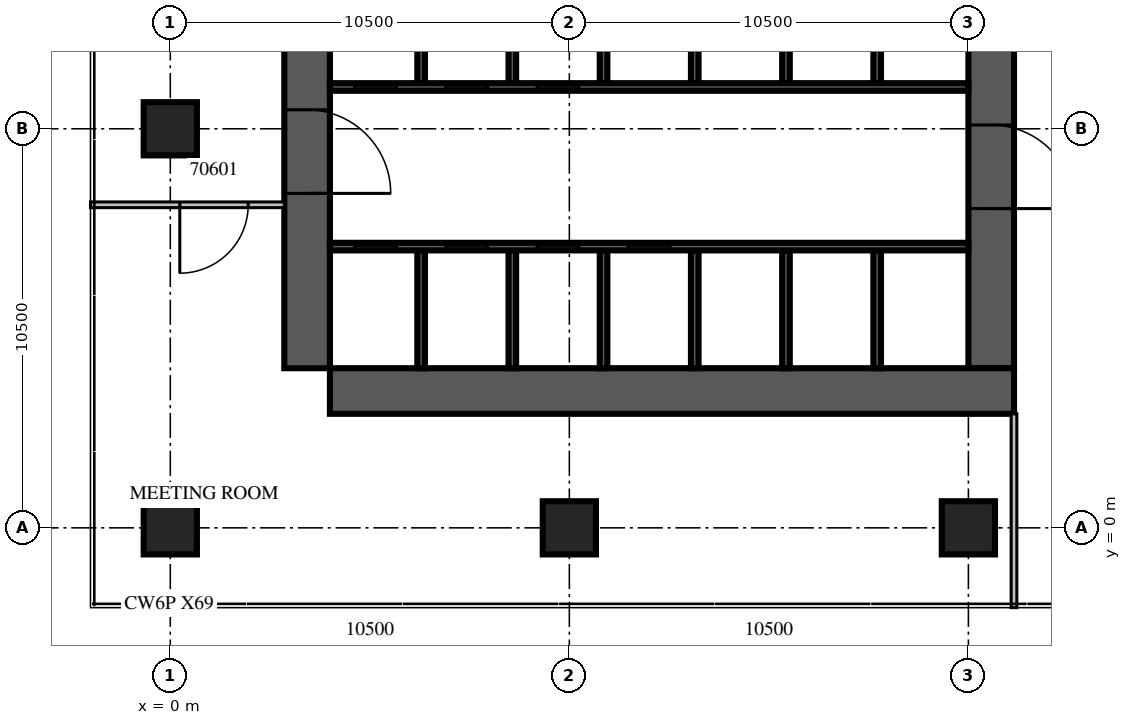
"""IFC4 building model, lengths in metres.
Left out: names, types, materials, properties, quantities, classifications, styles, units other than length and angle.
Written with IfcOpenShell. Run it as: python <this file> out.ifc"""

import sys

from ifc_helpers import new_model, si_unit, direction, frame, frame_2d, origin, origin_2d, place, context, subcontext, project, spatial, rectangle, extrude, source, transform, mapped, element, fill, save


model = new_model("IFC4")
c1 = context("Model", 3, precision=1e-05, world=origin(), true_north=direction((0.0, 1.0)))
c2 = subcontext(c1, "Body", "Model", "MODEL_VIEW")
j1 = project(units=[si_unit("LENGTHUNIT", "METRE"), si_unit("PLANEANGLEUNIT", "RADIAN")], contexts=[c1])
p1 = place(None, origin())
s1 = spatial("IfcSite", under=j1, at=p1, CompositionType="ELEMENT")
p2 = place(p1, origin())
s2 = spatial("IfcBuilding", under=s1, at=p2, CompositionType="ELEMENT")
p3 = place(p2, frame((0.0, 0.0, 18.3)))
s3 = spatial("IfcBuildingStorey", under=s2, at=p3, CompositionType="ELEMENT", Elevation=18.3)
m1 = source(origin(), c2, "Body", "SweptSolid", [
    extrude(rectangle(XDim=1.4, YDim=1.4, at=origin_2d()), origin(), (0.0, 0.0, 1.0), 5.4),
])
for number, where, z_axis, x_axis in (
    (1, (0.0, 0.0, 0.0), (0.0, 0.0, 1.0), (1.0, 0.0, 0.0)),
    (2, (0.0, 10.5, 0.0), (0.0, 0.0, 1.0), (1.0, 0.0, 0.0)),
    (3, (10.5, 0.0, 0.0), (0.0, 0.0, 1.0), (1.0, 0.0, 0.0)),
    (4, (21.0, 0.0, 0.0), (0.0, 0.0, 1.0), (1.0, 0.0, 0.0)),
):
    element("IfcColumn", number, at=place(p3, frame(where, z_axis=z_axis, x_axis=x_axis)), inside=s3, PredefinedType="COLUMN", context=c2, shape_type="MappedRepresentation", body=[
        mapped(m1, transform((0.0, 0.0, 0.0), scale=1.0)),
    ])
m2 = source(origin(), c2, "Body", "SweptSolid", [
    extrude(rectangle(XDim=18.0, YDim=1.2, at=frame_2d((9.0, 0.0))), origin(), (0.0, 0.0, 1.0), 5.4),
])
p4 = place(p3, frame((3.6, 4.2, 0.0), z_axis=(0.0, 0.0, 1.0), x_axis=(0.0, 1.0, 0.0)))
e5 = element("IfcWall", 5, at=p4, inside=s3, PredefinedType="SHEAR", context=c2, shape_type="MappedRepresentation", body=[
    mapped(m2, transform((0.0, 0.0, 0.0), scale=1.0)),
])
m3 = source(origin(), c2, "Body", "SweptSolid", [
    extrude(rectangle(XDim=2.2, YDim=2.1, at=frame_2d((1.1, 1.05))), frame((0.0, 0.61, 0.0), z_axis=(0.0, -1.0, 0.0), x_axis=(1.0, 0.0, 0.0)), (0.0, 0.0, 1.0), 1.22),
])
p5 = place(p4, frame((4.6, 0.0, 0.0)))
e6 = element("IfcOpeningElement", 6, at=p5, cuts=e5, PredefinedType="OPENING", context=c2, shape_type="MappedRepresentation", body=[
    mapped(m3, transform((0.0, 0.0, 0.0), scale=1.0)),
])
m4 = source(origin(), c2, "Body", "SweptSolid", [
    extrude(rectangle(XDim=16.8, YDim=1.2, at=frame_2d((8.4, 0.0))), origin(), (0.0, 0.0, 1.0), 5.4),
])
p6 = place(p3, frame((21.6, 4.2, 0.0), z_axis=(0.0, 0.0, 1.0), x_axis=(0.0, 1.0, 0.0)))
e7 = element("IfcWall", 7, at=p6, inside=s3, PredefinedType="SHEAR", context=c2, shape_type="MappedRepresentation", body=[
    mapped(m4, transform((0.0, 0.0, 0.0), scale=1.0)),
])
p7 = place(p6, frame((4.2, 0.0, 0.0)))
e8 = element("IfcOpeningElement", 8, at=p7, cuts=e7, PredefinedType="OPENING", context=c2, shape_type="MappedRepresentation", body=[
    mapped(m3, transform((0.0, 0.0, 0.0), scale=1.0)),
])
m5 = source(origin(), c2, "Body", "SweptSolid", [
    extrude(rectangle(XDim=1.2, YDim=2.1, at=frame_2d((0.6, 1.05))), frame((0.0, 0.61, 0.0), z_axis=(0.0, -1.0, 0.0), x_axis=(1.0, 0.0, 0.0)), (0.0, 0.0, 1.0), 1.22),
])
p8 = place(p6, frame((14.7, 0.0, 0.0)))
e9 = element("IfcOpeningElement", 9, at=p8, cuts=e7, PredefinedType="OPENING", context=c2, shape_type="MappedRepresentation", body=[
    mapped(m5, transform((0.0, 0.0, 0.0), scale=1.0)),
])
p9 = place(p3, frame((4.2, 3.6, 0.0), z_axis=(0.0, 0.0, 1.0), x_axis=(1.0, 0.0, 0.0)))
e10 = element("IfcWall", 10, at=p9, inside=s3, PredefinedType="SHEAR", context=c2, shape_type="MappedRepresentation", body=[
    mapped(m2, transform((0.0, 0.0, 0.0), scale=1.0)),
])
m6 = source(origin(), c2, "Body", "SweptSolid", [
    extrude(rectangle(XDim=3.1, YDim=0.2, at=frame_2d((1.55, 0.0))), origin(), (0.0, 0.0, 1.0), 5.4),
])
for number, where, z_axis, x_axis in (
    (11, (6.6, 4.2, 0.0), (0.0, 0.0, 1.0), (0.0, 1.0, 0.0)),
    (12, (9.0, 4.2, 0.0), (0.0, 0.0, 1.0), (0.0, 1.0, 0.0)),
    (13, (11.4, 4.2, 0.0), (0.0, 0.0, 1.0), (0.0, 1.0, 0.0)),
    (14, (13.8, 4.2, 0.0), (0.0, 0.0, 1.0), (0.0, 1.0, 0.0)),
    (15, (16.2, 4.2, 0.0), (0.0, 0.0, 1.0), (0.0, 1.0, 0.0)),
    (16, (18.6, 4.2, 0.0), (0.0, 0.0, 1.0), (0.0, 1.0, 0.0)),
):
    element("IfcWall", number, at=place(p3, frame(where, z_axis=z_axis, x_axis=x_axis)), inside=s3, PredefinedType="SOLIDWALL", context=c2, shape_type="MappedRepresentation", body=[
        mapped(m6, transform((0.0, 0.0, 0.0), scale=1.0)),
    ])
m7 = source(origin(), c2, "Body", "SweptSolid", [
    extrude(rectangle(XDim=3.0, YDim=0.2, at=frame_2d((1.5, 0.0))), origin(), (0.0, 0.0, 1.0), 5.4),
])
for number, where, z_axis, x_axis in (
    (17, (6.6, 11.7, 0.0), (0.0, 0.0, 1.0), (0.0, 1.0, 0.0)),
    (18, (9.0, 11.7, 0.0), (0.0, 0.0, 1.0), (0.0, 1.0, 0.0)),
    (19, (11.4, 11.7, 0.0), (0.0, 0.0, 1.0), (0.0, 1.0, 0.0)),
    (20, (13.8, 11.7, 0.0), (0.0, 0.0, 1.0), (0.0, 1.0, 0.0)),
    (21, (16.2, 11.7, 0.0), (0.0, 0.0, 1.0), (0.0, 1.0, 0.0)),
    (22, (18.6, 11.7, 0.0), (0.0, 0.0, 1.0), (0.0, 1.0, 0.0)),
):
    element("IfcWall", number, at=place(p3, frame(where, z_axis=z_axis, x_axis=x_axis)), inside=s3, PredefinedType="SOLIDWALL", context=c2, shape_type="MappedRepresentation", body=[
        mapped(m7, transform((0.0, 0.0, 0.0), scale=1.0)),
    ])
m8 = source(origin(), c2, "Body", "SweptSolid", [
    extrude(rectangle(XDim=16.8, YDim=0.2, at=frame_2d((8.4, 0.0))), origin(), (0.0, 0.0, 1.0), 5.4),
])
p10 = place(p3, frame((4.2, 7.4, 0.0), z_axis=(0.0, 0.0, 1.0), x_axis=(1.0, 0.0, 0.0)))
e23 = element("IfcWall", 23, at=p10, inside=s3, PredefinedType="SOLIDWALL", context=c2, shape_type="MappedRepresentation", body=[
    mapped(m8, transform((0.0, 0.0, 0.0), scale=1.0)),
])
m9 = source(origin(), c2, "Body", "SweptSolid", [
    extrude(rectangle(XDim=1.1, YDim=2.1, at=frame_2d((0.55, 1.05))), frame((0.0, 0.11, 0.0), z_axis=(0.0, -1.0, 0.0), x_axis=(1.0, 0.0, 0.0)), (0.0, 0.0, 1.0), 0.22),
])
p11 = place(p10, frame((0.65, 0.0, 0.0)))
e24 = element("IfcOpeningElement", 24, at=p11, cuts=e23, PredefinedType="OPENING", context=c2, shape_type="MappedRepresentation", body=[
    mapped(m9, transform((0.0, 0.0, 0.0), scale=1.0)),
])
p12 = place(p10, frame((3.05, 0.0, 0.0)))
e25 = element("IfcOpeningElement", 25, at=p12, cuts=e23, PredefinedType="OPENING", context=c2, shape_type="MappedRepresentation", body=[
    mapped(m9, transform((0.0, 0.0, 0.0), scale=1.0)),
])
p13 = place(p10, frame((5.45, 0.0, 0.0)))
e26 = element("IfcOpeningElement", 26, at=p13, cuts=e23, PredefinedType="OPENING", context=c2, shape_type="MappedRepresentation", body=[
    mapped(m9, transform((0.0, 0.0, 0.0), scale=1.0)),
])
p14 = place(p10, frame((7.85, 0.0, 0.0)))
e27 = element("IfcOpeningElement", 27, at=p14, cuts=e23, PredefinedType="OPENING", context=c2, shape_type="MappedRepresentation", body=[
    mapped(m9, transform((0.0, 0.0, 0.0), scale=1.0)),
])
p15 = place(p3, frame((4.2, 11.6, 0.0), z_axis=(0.0, 0.0, 1.0), x_axis=(1.0, 0.0, 0.0)))
e28 = element("IfcWall", 28, at=p15, inside=s3, PredefinedType="SOLIDWALL", context=c2, shape_type="MappedRepresentation", body=[
    mapped(m8, transform((0.0, 0.0, 0.0), scale=1.0)),
])
p16 = place(p15, frame((0.65, 0.0, 0.0)))
e29 = element("IfcOpeningElement", 29, at=p16, cuts=e28, PredefinedType="OPENING", context=c2, shape_type="MappedRepresentation", body=[
    mapped(m9, transform((0.0, 0.0, 0.0), scale=1.0)),
])
p17 = place(p15, frame((3.05, 0.0, 0.0)))
e30 = element("IfcOpeningElement", 30, at=p17, cuts=e28, PredefinedType="OPENING", context=c2, shape_type="MappedRepresentation", body=[
    mapped(m9, transform((0.0, 0.0, 0.0), scale=1.0)),
])
p18 = place(p15, frame((5.45, 0.0, 0.0)))
e31 = element("IfcOpeningElement", 31, at=p18, cuts=e28, PredefinedType="OPENING", context=c2, shape_type="MappedRepresentation", body=[
    mapped(m9, transform((0.0, 0.0, 0.0), scale=1.0)),
])
m10 = source(origin(), c2, "Body", "SweptSolid", [
    extrude(rectangle(XDim=5.1, YDim=0.15, at=frame_2d((2.55, 0.0))), origin(), (0.0, 0.0, 1.0), 4.8),
])
p19 = place(p3, frame((-2.1, 8.5, 0.0), z_axis=(0.0, 0.0, 1.0), x_axis=(1.0, 0.0, 0.0)))
e32 = element("IfcWall", 32, at=p19, inside=s3, PredefinedType="PARTITIONING", context=c2, shape_type="MappedRepresentation", body=[
    mapped(m10, transform((0.0, 0.0, 0.0), scale=1.0)),
])
m11 = source(origin(), c2, "Body", "SweptSolid", [
    extrude(rectangle(XDim=1.8, YDim=2.1, at=frame_2d((0.9, 1.05))), frame((0.0, 0.085, 0.0), z_axis=(0.0, -1.0, 0.0), x_axis=(1.0, 0.0, 0.0)), (0.0, 0.0, 1.0), 0.17),
])
p20 = place(p19, frame((2.35, 0.0, 0.0)))
e33 = element("IfcOpeningElement", 33, at=p20, cuts=e32, PredefinedType="OPENING", context=c2, shape_type="MappedRepresentation", body=[
    mapped(m11, transform((0.0, 0.0, 0.0), scale=1.0)),
])
p21 = place(p3, frame((22.2, -2.1, 0.0), z_axis=(0.0, 0.0, 1.0), x_axis=(0.0, 1.0, 0.0)))
e34 = element("IfcWall", 34, at=p21, inside=s3, PredefinedType="PARTITIONING", context=c2, shape_type="MappedRepresentation", body=[
    mapped(m10, transform((0.0, 0.0, 0.0), scale=1.0)),
])
m12 = source(origin(), c2, "Body", "SweptSolid", [
    extrude(rectangle(XDim=1.1, YDim=2.1, at=frame_2d((0.55, 1.05))), frame((0.0, 0.025, 0.0), z_axis=(0.0, -1.0, 0.0), x_axis=(1.0, 0.0, 0.0)), (0.0, 0.0, 1.0), 0.05),
])
p22 = place(p11, origin())
e35 = element("IfcDoor", 35, at=p22, inside=s3, OperationType="SLIDING_TO_LEFT", PredefinedType="DOOR", context=c2, shape_type="MappedRepresentation", body=[
    mapped(m12, transform((0.0, 0.0, 0.0), scale=1.0)),
])
fill(e24, e35)
p23 = place(p12, origin())
e36 = element("IfcDoor", 36, at=p23, inside=s3, OperationType="SLIDING_TO_LEFT", PredefinedType="DOOR", context=c2, shape_type="MappedRepresentation", body=[
    mapped(m12, transform((0.0, 0.0, 0.0), scale=1.0)),
])
fill(e25, e36)
p24 = place(p13, origin())
e37 = element("IfcDoor", 37, at=p24, inside=s3, OperationType="SLIDING_TO_LEFT", PredefinedType="DOOR", context=c2, shape_type="MappedRepresentation", body=[
    mapped(m12, transform((0.0, 0.0, 0.0), scale=1.0)),
])
fill(e26, e37)
p25 = place(p14, origin())
e38 = element("IfcDoor", 38, at=p25, inside=s3, OperationType="SLIDING_TO_LEFT", PredefinedType="DOOR", context=c2, shape_type="MappedRepresentation", body=[
    mapped(m12, transform((0.0, 0.0, 0.0), scale=1.0)),
])
fill(e27, e38)
p26 = place(p16, origin())
e39 = element("IfcDoor", 39, at=p26, inside=s3, OperationType="SLIDING_TO_LEFT", PredefinedType="DOOR", context=c2, shape_type="MappedRepresentation", body=[
    mapped(m12, transform((0.0, 0.0, 0.0), scale=1.0)),
])
fill(e29, e39)
p27 = place(p17, origin())
e40 = element("IfcDoor", 40, at=p27, inside=s3, OperationType="SLIDING_TO_LEFT", PredefinedType="DOOR", context=c2, shape_type="MappedRepresentation", body=[
    mapped(m12, transform((0.0, 0.0, 0.0), scale=1.0)),
])
fill(e30, e40)
p28 = place(p18, origin())
e41 = element("IfcDoor", 41, at=p28, inside=s3, OperationType="SLIDING_TO_LEFT", PredefinedType="DOOR", context=c2, shape_type="MappedRepresentation", body=[
    mapped(m12, transform((0.0, 0.0, 0.0), scale=1.0)),
])
fill(e31, e41)
m13 = source(origin(), c2, "Body", "SweptSolid", [
    extrude(rectangle(XDim=2.2, YDim=2.1, at=frame_2d((1.1, 1.05))), frame((0.0, 0.025, 0.0), z_axis=(0.0, -1.0, 0.0), x_axis=(1.0, 0.0, 0.0)), (0.0, 0.0, 1.0), 0.05),
])
p29 = place(p7, origin())
e42 = element("IfcDoor", 42, at=p29, inside=s3, OperationType="DOUBLE_DOOR_SINGLE_SWING", PredefinedType="DOOR", context=c2, shape_type="MappedRepresentation", body=[
    mapped(m13, transform((0.0, 0.0, 0.0), scale=1.0)),
])
fill(e8, e42)
p30 = place(p5, origin())
e43 = element("IfcDoor", 43, at=p30, inside=s3, OperationType="DOUBLE_DOOR_SINGLE_SWING", PredefinedType="DOOR", context=c2, shape_type="MappedRepresentation", body=[
    mapped(m13, transform((0.0, 0.0, 0.0), scale=1.0)),
])
fill(e6, e43)
m14 = source(origin(), c2, "Body", "SweptSolid", [
    extrude(rectangle(XDim=1.8, YDim=2.1, at=frame_2d((0.9, 1.05))), frame((0.0, 0.025, 0.0), z_axis=(0.0, -1.0, 0.0), x_axis=(1.0, 0.0, 0.0)), (0.0, 0.0, 1.0), 0.05),
])
p31 = place(p20, origin())
e44 = element("IfcDoor", 44, at=p31, inside=s3, OperationType="DOUBLE_DOOR_SINGLE_SWING", PredefinedType="DOOR", context=c2, shape_type="MappedRepresentation", body=[
    mapped(m14, transform((0.0, 0.0, 0.0), scale=1.0)),
])
fill(e33, e44)
save(model, sys.argv[1])
